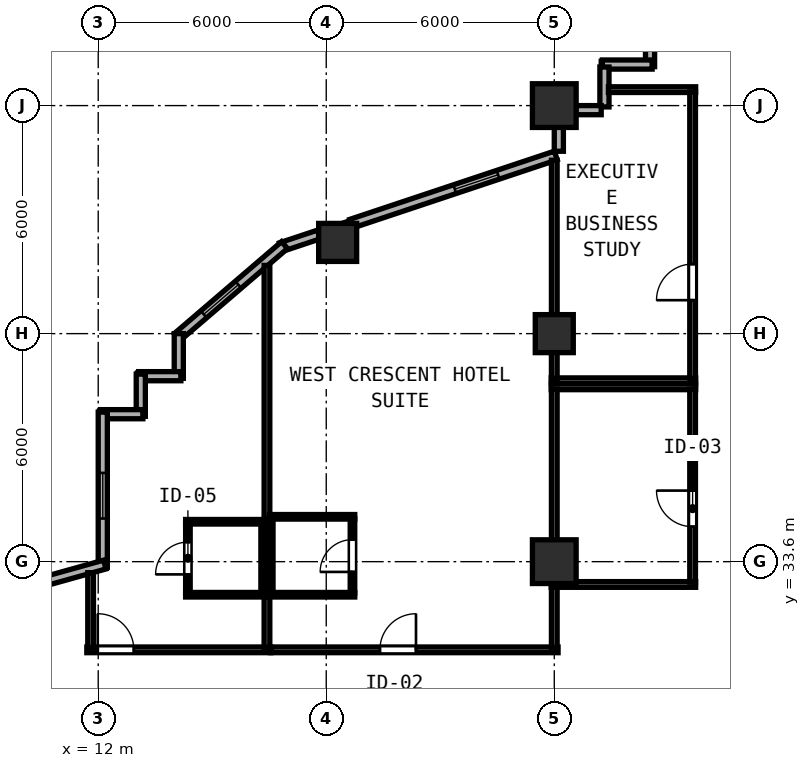
"""IFC4 building model, lengths in metres.
Left out: names, types, materials, properties, quantities, classifications, styles, units other than length and angle.
Written with IfcOpenShell. Run it as: python <this file> out.ifc"""

import sys

from ifc_helpers import new_model, si_unit, direction, frame, frame_2d, origin, origin_2d, place, context, subcontext, project, spatial, rectangle, hollow_rectangle, extrude, element, fill, save


model = new_model("IFC4")
c1 = context("Model", 3, precision=1e-05, world=origin(), true_north=direction((0.0, 1.0)))
c2 = subcontext(c1, "Body", "Model", "MODEL_VIEW")
j1 = project(units=[si_unit("LENGTHUNIT", "METRE"), si_unit("PLANEANGLEUNIT", "RADIAN")], contexts=[c1])
p1 = place(None, origin())
s1 = spatial("IfcSite", under=j1, at=p1, CompositionType="ELEMENT")
p2 = place(p1, origin())
s2 = spatial("IfcBuilding", under=s1, at=p2, CompositionType="ELEMENT")
p3 = place(p2, frame((0.0, 0.0, 62.8)))
s3 = spatial("IfcBuildingStorey", under=s2, at=p3, CompositionType="ELEMENT", Elevation=62.8)
for number, where, z_axis, x_axis in (
    (1, (24.0, 33.6, 0.0), (0.0, 0.0, 1.0), (1.0, 0.0, 0.0)),
    (2, (24.0, 45.6, 0.0), (0.0, 0.0, 1.0), (1.0, 0.0, 0.0)),
):
    element("IfcColumn", number, at=place(p3, frame(where, z_axis=z_axis, x_axis=x_axis)), inside=s3, PredefinedType="COLUMN", context=c2, shape_type="SweptSolid", body=[
        extrude(hollow_rectangle(XDim=1.15, YDim=1.15, WallThickness=0.042, at=origin_2d()), origin(), (0.0, 0.0, 1.0), 3.8),
    ])
for number, where, z_axis, x_axis in (
    (3, (24.0, 39.6, 0.0), (0.0, 0.0, 1.0), (1.0, 0.0, 0.0)),
    (4, (18.3, 42.0, 0.0), (0.0, 0.0, 1.0), (1.0, 0.0, 0.0)),
):
    element("IfcColumn", number, at=place(p3, frame(where, z_axis=z_axis, x_axis=x_axis)), inside=s3, PredefinedType="COLUMN", context=c2, shape_type="SweptSolid", body=[
        extrude(hollow_rectangle(XDim=1.0, YDim=1.0, WallThickness=0.038, at=origin_2d()), origin(), (0.0, 0.0, 1.0), 3.8),
    ])
p4 = place(p3, frame((26.52, 47.995, 0.0), z_axis=(0.0, 0.0, 1.0), x_axis=(0.0, -1.0, 0.0)))
e5 = element("IfcWall", 5, at=p4, inside=s3, PredefinedType="SOLIDWALL", context=c2, shape_type="SweptSolid", body=[
    extrude(rectangle(XDim=1.37, YDim=0.24, at=frame_2d((0.685, 0.0))), origin(), (0.0, 0.0, 1.0), 3.6),
])
p5 = place(p3, frame((26.575, 46.68, 0.0), z_axis=(0.0, 0.0, 1.0), x_axis=(-1.0, 0.0, 0.0)))
e6 = element("IfcWall", 6, at=p5, inside=s3, PredefinedType="SOLIDWALL", context=c2, shape_type="SweptSolid", body=[
    extrude(rectangle(XDim=1.31, YDim=0.24, at=frame_2d((0.655, 0.0))), origin(), (0.0, 0.0, 1.0), 3.6),
])
p6 = place(p3, frame((25.32, 46.615, 0.0), z_axis=(0.0, 0.0, 1.0), x_axis=(0.0, -1.0, 0.0)))
e7 = element("IfcWall", 7, at=p6, inside=s3, PredefinedType="SOLIDWALL", context=c2, shape_type="SweptSolid", body=[
    extrude(rectangle(XDim=1.05, YDim=0.24, at=frame_2d((0.525, 0.0))), origin(), (0.0, 0.0, 1.0), 3.6),
])
p7 = place(p3, frame((25.235, 45.48, 0.0), z_axis=(0.0, 0.0, 1.0), x_axis=(-1.0, 0.0, 0.0)))
e8 = element("IfcWall", 8, at=p7, inside=s3, PredefinedType="SOLIDWALL", context=c2, shape_type="SweptSolid", body=[
    extrude(rectangle(XDim=0.668, YDim=0.24, at=frame_2d((0.334, 0.0))), origin(), (0.0, 0.0, 1.0), 3.6),
])
p8 = place(p3, frame((24.12, 45.033, 0.0), z_axis=(0.0, 0.0, 1.0), x_axis=(0.0, -1.0, 0.0)))
e9 = element("IfcWall", 9, at=p8, inside=s3, PredefinedType="SOLIDWALL", context=c2, shape_type="SweptSolid", body=[
    extrude(rectangle(XDim=0.635, YDim=0.24, at=frame_2d((0.317, 0.0))), origin(), (0.0, 0.0, 1.0), 3.097),
])
p9 = place(p3, frame((24.039, 44.287, 0.0), z_axis=(0.0, 0.0, 1.0), x_axis=(-0.948678995954, -0.316240672014, 0.0)))
e10 = element("IfcWall", 10, at=p9, inside=s3, PredefinedType="SOLIDWALL", context=c2, shape_type="SweptSolid", body=[
    extrude(rectangle(XDim=5.675, YDim=0.24, at=frame_2d((2.837, 0.0))), origin(), (0.0, 0.0, 1.0), 3.097),
])
p10 = place(p9, frame((1.6, 0.0, 0.85)))
e11 = element("IfcOpeningElement", 11, at=p10, cuts=e10, PredefinedType="OPENING", context=c2, shape_type="SweptSolid", body=[
    extrude(rectangle(XDim=1.2, YDim=1.85, at=frame_2d((0.6, 0.925))), frame((0.0, 0.13, 0.0), z_axis=(0.0, -1.0, 0.0), x_axis=(1.0, 0.0, 0.0)), (0.0, 0.0, 1.0), 0.26),
])
p11 = place(p3, frame((17.808, 42.209, 0.0), z_axis=(0.0, 0.0, 1.0), x_axis=(-0.948706457285, -0.316158279832, 0.0)))
e12 = element("IfcWall", 12, at=p11, inside=s3, PredefinedType="SOLIDWALL", context=c2, shape_type="SweptSolid", body=[
    extrude(rectangle(XDim=1.054, YDim=0.24, at=frame_2d((0.527, 0.0))), origin(), (0.0, 0.0, 1.0), 3.6),
])
p12 = place(p3, frame((16.902, 41.929, 0.0), z_axis=(0.0, 0.0, 1.0), x_axis=(-0.759275136126, -0.650769750112, 0.0)))
e13 = element("IfcWall", 13, at=p12, inside=s3, PredefinedType="SOLIDWALL", context=c2, shape_type="SweptSolid", body=[
    extrude(rectangle(XDim=3.719, YDim=0.24, at=frame_2d((1.86, 0.0))), origin(), (0.0, 0.0, 1.0), 3.6),
])
p13 = place(p12, frame((1.6, 0.0, 0.85)))
e14 = element("IfcOpeningElement", 14, at=p13, cuts=e13, PredefinedType="OPENING", context=c2, shape_type="SweptSolid", body=[
    extrude(rectangle(XDim=1.2, YDim=1.85, at=frame_2d((0.6, 0.925))), frame((0.0, 0.13, 0.0), z_axis=(0.0, -1.0, 0.0), x_axis=(1.0, 0.0, 0.0)), (0.0, 0.0, 1.0), 0.26),
])
p14 = place(p3, frame((14.12, 39.6, 0.0), z_axis=(0.0, 0.0, 1.0), x_axis=(0.0, -1.0, 0.0)))
e15 = element("IfcWall", 15, at=p14, inside=s3, PredefinedType="SOLIDWALL", context=c2, shape_type="SweptSolid", body=[
    extrude(rectangle(XDim=1.175, YDim=0.24, at=frame_2d((0.587, 0.0))), origin(), (0.0, 0.0, 1.0), 3.6),
])
p15 = place(p3, frame((14.175, 38.48, 0.0), z_axis=(0.0, 0.0, 1.0), x_axis=(-1.0, 0.0, 0.0)))
e16 = element("IfcWall", 16, at=p15, inside=s3, PredefinedType="SOLIDWALL", context=c2, shape_type="SweptSolid", body=[
    extrude(rectangle(XDim=1.11, YDim=0.24, at=frame_2d((0.555, 0.0))), origin(), (0.0, 0.0, 1.0), 3.6),
])
p16 = place(p3, frame((13.12, 38.535, 0.0), z_axis=(0.0, 0.0, 1.0), x_axis=(0.0, -1.0, 0.0)))
e17 = element("IfcWall", 17, at=p16, inside=s3, PredefinedType="SOLIDWALL", context=c2, shape_type="SweptSolid", body=[
    extrude(rectangle(XDim=1.11, YDim=0.24, at=frame_2d((0.555, 0.0))), origin(), (0.0, 0.0, 1.0), 3.6),
])
p17 = place(p3, frame((13.175, 37.48, 0.0), z_axis=(0.0, 0.0, 1.0), x_axis=(-1.0, 0.0, 0.0)))
e18 = element("IfcWall", 18, at=p17, inside=s3, PredefinedType="SOLIDWALL", context=c2, shape_type="SweptSolid", body=[
    extrude(rectangle(XDim=1.11, YDim=0.24, at=frame_2d((0.555, 0.0))), origin(), (0.0, 0.0, 1.0), 3.6),
])
p18 = place(p3, frame((12.12, 37.535, 0.0), z_axis=(0.0, 0.0, 1.0), x_axis=(0.0, -1.0, 0.0)))
e19 = element("IfcWall", 19, at=p18, inside=s3, PredefinedType="SOLIDWALL", context=c2, shape_type="SweptSolid", body=[
    extrude(rectangle(XDim=4.081, YDim=0.24, at=frame_2d((2.041, 0.0))), origin(), (0.0, 0.0, 1.0), 3.6),
])
p19 = place(p18, frame((1.6, 0.0, 0.85)))
e20 = element("IfcOpeningElement", 20, at=p19, cuts=e19, PredefinedType="OPENING", context=c2, shape_type="SweptSolid", body=[
    extrude(rectangle(XDim=1.2, YDim=1.85, at=frame_2d((0.6, 0.925))), frame((0.0, 0.13, 0.0), z_axis=(0.0, -1.0, 0.0), x_axis=(1.0, 0.0, 0.0)), (0.0, 0.0, 1.0), 0.26),
])
p20 = place(p3, frame((12.173, 33.524, 0.0), z_axis=(0.0, 0.0, 1.0), x_axis=(-0.963197271032, -0.268795493036, 0.0)))
e21 = element("IfcWall", 21, at=p20, inside=s3, PredefinedType="SOLIDWALL", context=c2, shape_type="SweptSolid", body=[
    extrude(rectangle(XDim=9.095, YDim=0.24, at=frame_2d((4.548, 0.0))), origin(), (0.0, 0.0, 1.0), 3.6),
])
p21 = place(p20, frame((1.6, 0.0, 0.85)))
e22 = element("IfcOpeningElement", 22, at=p21, cuts=e21, PredefinedType="OPENING", context=c2, shape_type="SweptSolid", body=[
    extrude(rectangle(XDim=1.2, YDim=1.85, at=frame_2d((0.6, 0.925))), frame((0.0, 0.13, 0.0), z_axis=(0.0, -1.0, 0.0), x_axis=(1.0, 0.0, 0.0)), (0.0, 0.0, 1.0), 0.26),
])
p22 = place(p20, frame((7.0, 0.0, 0.85)))
e23 = element("IfcOpeningElement", 23, at=p22, cuts=e21, PredefinedType="OPENING", context=c2, shape_type="SweptSolid", body=[
    extrude(rectangle(XDim=1.2, YDim=1.85, at=frame_2d((0.6, 0.925))), frame((0.0, 0.13, 0.0), z_axis=(0.0, -1.0, 0.0), x_axis=(1.0, 0.0, 0.0)), (0.0, 0.0, 1.0), 0.26),
])
for number, where, z_axis, x_axis in (
    (24, (23.92, 38.2, 0.0), (0.0, 0.0, 1.0), (1.0, 0.0, 0.0)),
    (25, (23.92, 33.0, 0.0), (0.0, 0.0, 1.0), (1.0, 0.0, 0.0)),
):
    element("IfcWall", number, at=place(p3, frame(where, z_axis=z_axis, x_axis=x_axis)), inside=s3, PredefinedType="PARTITIONING", context=c2, shape_type="SweptSolid", body=[
        extrude(rectangle(XDim=3.8, YDim=0.15, at=frame_2d((1.9, 0.0))), origin(), (0.0, 0.0, 1.0), 3.6),
    ])
p23 = place(p3, frame((24.0, 33.06, 0.0), z_axis=(0.0, 0.0, 1.0), x_axis=(0.0, 1.0, 0.0)))
e26 = element("IfcWall", 26, at=p23, inside=s3, PredefinedType="PARTITIONING", context=c2, shape_type="SweptSolid", body=[
    extrude(rectangle(XDim=5.08, YDim=0.15, at=frame_2d((2.54, 0.0))), origin(), (0.0, 0.0, 1.0), 3.097),
])
p24 = place(p3, frame((27.64, 33.06, 0.0), z_axis=(0.0, 0.0, 1.0), x_axis=(0.0, 1.0, 0.0)))
e27 = element("IfcWall", 27, at=p24, inside=s3, PredefinedType="PARTITIONING", context=c2, shape_type="SweptSolid", body=[
    extrude(rectangle(XDim=5.08, YDim=0.15, at=frame_2d((2.54, 0.0))), origin(), (0.0, 0.0, 1.0), 3.6),
])
p25 = place(p24, frame((2.41, 0.0, 0.0), z_axis=(0.0, 0.0, 1.0), x_axis=(-1.0, 0.0, 0.0)))
e28 = element("IfcOpeningElement", 28, at=p25, cuts=e27, PredefinedType="OPENING", context=c2, shape_type="SweptSolid", body=[
    extrude(rectangle(XDim=0.95, YDim=2.12, at=frame_2d((0.475, 1.06))), frame((0.0, 0.085, 0.0), z_axis=(0.0, -1.0, 0.0), x_axis=(1.0, 0.0, 0.0)), (0.0, 0.0, 1.0), 0.17),
])
p26 = place(p3, frame((25.425, 46.02, 0.0), z_axis=(0.0, 0.0, 1.0), x_axis=(1.0, 0.0, 0.0)))
e29 = element("IfcWall", 29, at=p26, inside=s3, PredefinedType="PARTITIONING", context=c2, shape_type="SweptSolid", body=[
    extrude(rectangle(XDim=2.295, YDim=0.15, at=frame_2d((1.147, 0.0))), origin(), (0.0, 0.0, 1.0), 3.6),
])
p27 = place(p3, frame((23.92, 38.36, 0.0), z_axis=(0.0, 0.0, 1.0), x_axis=(1.0, 0.0, 0.0)))
e30 = element("IfcWall", 30, at=p27, inside=s3, PredefinedType="PARTITIONING", context=c2, shape_type="SweptSolid", body=[
    extrude(rectangle(XDim=3.8, YDim=0.15, at=frame_2d((1.9, 0.0))), origin(), (0.0, 0.0, 1.0), 3.6),
])
p28 = place(p3, frame((24.0, 38.42, 0.0), z_axis=(0.0, 0.0, 1.0), x_axis=(0.0, 1.0, 0.0)))
e31 = element("IfcWall", 31, at=p28, inside=s3, PredefinedType="PARTITIONING", context=c2, shape_type="SweptSolid", body=[
    extrude(rectangle(XDim=5.743, YDim=0.15, at=frame_2d((2.872, 0.0))), origin(), (0.0, 0.0, 1.0), 3.097),
])
p29 = place(p3, frame((27.64, 38.42, 0.0), z_axis=(0.0, 0.0, 1.0), x_axis=(0.0, 1.0, 0.0)))
e32 = element("IfcWall", 32, at=p29, inside=s3, PredefinedType="PARTITIONING", context=c2, shape_type="SweptSolid", body=[
    extrude(rectangle(XDim=7.54, YDim=0.15, at=frame_2d((3.77, 0.0))), origin(), (0.0, 0.0, 1.0), 3.6),
])
p30 = place(p29, frame((3.01, 0.0, 0.0), z_axis=(0.0, 0.0, 1.0), x_axis=(-1.0, 0.0, 0.0)))
e33 = element("IfcOpeningElement", 33, at=p30, cuts=e32, PredefinedType="OPENING", context=c2, shape_type="SweptSolid", body=[
    extrude(rectangle(XDim=0.95, YDim=2.12, at=frame_2d((0.475, 1.06))), frame((0.0, 0.085, 0.0), z_axis=(0.0, -1.0, 0.0), x_axis=(1.0, 0.0, 0.0)), (0.0, 0.0, 1.0), 0.17),
])
p31 = place(p3, frame((11.7, 31.28, 0.0), z_axis=(0.0, 0.0, 1.0), x_axis=(1.0, 0.0, 0.0)))
e34 = element("IfcWall", 34, at=p31, inside=s3, PredefinedType="PARTITIONING", context=c2, shape_type="SweptSolid", body=[
    extrude(rectangle(XDim=4.84, YDim=0.15, at=frame_2d((2.42, 0.0))), origin(), (0.0, 0.0, 1.0), 3.6),
])
p32 = place(p31, frame((0.288, 0.0, 0.0)))
e35 = element("IfcOpeningElement", 35, at=p32, cuts=e34, PredefinedType="OPENING", context=c2, shape_type="SweptSolid", body=[
    extrude(rectangle(XDim=0.95, YDim=2.15, at=frame_2d((0.475, 1.075))), frame((0.0, 0.085, 0.0), z_axis=(0.0, -1.0, 0.0), x_axis=(1.0, 0.0, 0.0)), (0.0, 0.0, 1.0), 0.17),
])
p33 = place(p3, frame((11.8, 31.34, 0.0), z_axis=(0.0, 0.0, 1.0), x_axis=(0.0, 1.0, 0.0)))
e36 = element("IfcWall", 36, at=p33, inside=s3, PredefinedType="PARTITIONING", context=c2, shape_type="SweptSolid", body=[
    extrude(rectangle(XDim=1.97, YDim=0.15, at=frame_2d((0.985, 0.0))), origin(), (0.0, 0.0, 1.0), 3.6),
])
p34 = place(p3, frame((16.44, 31.34, 0.0), z_axis=(0.0, 0.0, 1.0), x_axis=(0.0, 1.0, 0.0)))
e37 = element("IfcWall", 37, at=p34, inside=s3, PredefinedType="PARTITIONING", context=c2, shape_type="SweptSolid", body=[
    extrude(rectangle(XDim=10.055, YDim=0.15, at=frame_2d((5.027, 0.0))), origin(), (0.0, 0.0, 1.0), 3.6),
])
for number, where, z_axis, x_axis in (
    (38, (14.3, 34.65, 0.0), (0.0, 0.0, 1.0), (1.0, 0.0, 0.0)),
    (39, (14.3, 32.73, 0.0), (0.0, 0.0, 1.0), (1.0, 0.0, 0.0)),
):
    element("IfcWall", number, at=place(p3, frame(where, z_axis=z_axis, x_axis=x_axis)), inside=s3, PredefinedType="PARTITIONING", context=c2, shape_type="SweptSolid", body=[
        extrude(rectangle(XDim=2.08, YDim=0.12, at=frame_2d((1.04, 0.0))), origin(), (0.0, 0.0, 1.0), 3.6),
    ])
p35 = place(p3, frame((14.36, 32.775, 0.0), z_axis=(0.0, 0.0, 1.0), x_axis=(0.0, 1.0, 0.0)))
e40 = element("IfcWall", 40, at=p35, inside=s3, PredefinedType="PARTITIONING", context=c2, shape_type="SweptSolid", body=[
    extrude(rectangle(XDim=1.83, YDim=0.12, at=frame_2d((0.915, 0.0))), origin(), (0.0, 0.0, 1.0), 3.6),
])
p36 = place(p35, frame((1.34, 0.0, 0.0), z_axis=(0.0, 0.0, 1.0), x_axis=(-1.0, 0.0, 0.0)))
e41 = element("IfcOpeningElement", 41, at=p36, cuts=e40, PredefinedType="OPENING", context=c2, shape_type="SweptSolid", body=[
    extrude(rectangle(XDim=0.85, YDim=2.1, at=frame_2d((0.425, 1.05))), frame((0.0, 0.07, 0.0), z_axis=(0.0, -1.0, 0.0), x_axis=(1.0, 0.0, 0.0)), (0.0, 0.0, 1.0), 0.14),
])
p37 = place(p3, frame((16.34, 32.775, 0.0), z_axis=(0.0, 0.0, 1.0), x_axis=(0.0, 1.0, 0.0)))
e42 = element("IfcWall", 42, at=p37, inside=s3, PredefinedType="PARTITIONING", context=c2, shape_type="SweptSolid", body=[
    extrude(rectangle(XDim=1.83, YDim=0.12, at=frame_2d((0.915, 0.0))), origin(), (0.0, 0.0, 1.0), 3.6),
])
p38 = place(p3, frame((16.542, 31.28, 0.0), z_axis=(0.0, 0.0, 1.0), x_axis=(1.0, 0.0, 0.0)))
e43 = element("IfcWall", 43, at=p38, inside=s3, PredefinedType="PARTITIONING", context=c2, shape_type="SweptSolid", body=[
    extrude(rectangle(XDim=7.558, YDim=0.15, at=frame_2d((3.779, 0.0))), origin(), (0.0, 0.0, 1.0), 3.6),
])
p39 = place(p38, frame((2.869, 0.0, 0.0)))
e44 = element("IfcOpeningElement", 44, at=p39, cuts=e43, PredefinedType="OPENING", context=c2, shape_type="SweptSolid", body=[
    extrude(rectangle(XDim=0.95, YDim=2.18, at=frame_2d((0.475, 1.09))), frame((0.0, 0.085, 0.0), z_axis=(0.0, -1.0, 0.0), x_axis=(1.0, 0.0, 0.0)), (0.0, 0.0, 1.0), 0.17),
])
p40 = place(p3, frame((24.0, 31.34, 0.0), z_axis=(0.0, 0.0, 1.0), x_axis=(0.0, 1.0, 0.0)))
e45 = element("IfcWall", 45, at=p40, inside=s3, PredefinedType="PARTITIONING", context=c2, shape_type="SweptSolid", body=[
    extrude(rectangle(XDim=1.6, YDim=0.15, at=frame_2d((0.8, 0.0))), origin(), (0.0, 0.0, 1.0), 3.097),
])
for number, where, z_axis, x_axis in (
    (46, (16.5, 34.78, 0.0), (0.0, 0.0, 1.0), (1.0, 0.0, 0.0)),
    (47, (16.5, 32.73, 0.0), (0.0, 0.0, 1.0), (1.0, 0.0, 0.0)),
):
    element("IfcWall", number, at=place(p3, frame(where, z_axis=z_axis, x_axis=x_axis)), inside=s3, PredefinedType="PARTITIONING", context=c2, shape_type="SweptSolid", body=[
        extrude(rectangle(XDim=2.25, YDim=0.12, at=frame_2d((1.125, 0.0))), origin(), (0.0, 0.0, 1.0), 3.6),
    ])
p41 = place(p3, frame((16.54, 32.775, 0.0), z_axis=(0.0, 0.0, 1.0), x_axis=(0.0, 1.0, 0.0)))
e48 = element("IfcWall", 48, at=p41, inside=s3, PredefinedType="PARTITIONING", context=c2, shape_type="SweptSolid", body=[
    extrude(rectangle(XDim=1.96, YDim=0.12, at=frame_2d((0.98, 0.0))), origin(), (0.0, 0.0, 1.0), 3.6),
])
p42 = place(p3, frame((18.69, 32.775, 0.0), z_axis=(0.0, 0.0, 1.0), x_axis=(0.0, 1.0, 0.0)))
e49 = element("IfcWall", 49, at=p42, inside=s3, PredefinedType="PARTITIONING", context=c2, shape_type="SweptSolid", body=[
    extrude(rectangle(XDim=1.96, YDim=0.12, at=frame_2d((0.98, 0.0))), origin(), (0.0, 0.0, 1.0), 3.6),
])
p43 = place(p42, frame((0.555, 0.0, 0.0)))
e50 = element("IfcOpeningElement", 50, at=p43, cuts=e49, PredefinedType="OPENING", context=c2, shape_type="SweptSolid", body=[
    extrude(rectangle(XDim=0.85, YDim=2.1, at=frame_2d((0.425, 1.05))), frame((0.0, 0.07, 0.0), z_axis=(0.0, -1.0, 0.0), x_axis=(1.0, 0.0, 0.0)), (0.0, 0.0, 1.0), 0.14),
])
p44 = place(p10, origin())
e51 = element("IfcWindow", 51, at=p44, inside=s3, PartitioningType="SINGLE_PANEL", PredefinedType="WINDOW", context=c2, shape_type="SweptSolid", body=[
    extrude(rectangle(XDim=1.2, YDim=1.85, at=frame_2d((0.6, 0.925))), frame((0.0, 0.03, 0.0), z_axis=(0.0, -1.0, 0.0), x_axis=(1.0, 0.0, 0.0)), (0.0, 0.0, 1.0), 0.06),
])
fill(e11, e51)
p45 = place(p13, origin())
e52 = element("IfcWindow", 52, at=p45, inside=s3, PartitioningType="SINGLE_PANEL", PredefinedType="WINDOW", context=c2, shape_type="SweptSolid", body=[
    extrude(rectangle(XDim=1.2, YDim=1.85, at=frame_2d((0.6, 0.925))), frame((0.0, 0.03, 0.0), z_axis=(0.0, -1.0, 0.0), x_axis=(1.0, 0.0, 0.0)), (0.0, 0.0, 1.0), 0.06),
])
fill(e14, e52)
p46 = place(p19, origin())
e53 = element("IfcWindow", 53, at=p46, inside=s3, PartitioningType="SINGLE_PANEL", PredefinedType="WINDOW", context=c2, shape_type="SweptSolid", body=[
    extrude(rectangle(XDim=1.2, YDim=1.85, at=frame_2d((0.6, 0.925))), frame((0.0, 0.03, 0.0), z_axis=(0.0, -1.0, 0.0), x_axis=(1.0, 0.0, 0.0)), (0.0, 0.0, 1.0), 0.06),
])
fill(e20, e53)
p47 = place(p25, origin())
e54 = element("IfcDoor", 54, at=p47, inside=s3, OperationType="SINGLE_SWING_LEFT", PredefinedType="DOOR", context=c2, shape_type="SweptSolid", body=[
    extrude(rectangle(XDim=0.95, YDim=2.12, at=frame_2d((0.475, 1.06))), frame((0.0, 0.025, 0.0), z_axis=(0.0, -1.0, 0.0), x_axis=(1.0, 0.0, 0.0)), (0.0, 0.0, 1.0), 0.05),
])
fill(e28, e54)
p48 = place(p30, origin())
e55 = element("IfcDoor", 55, at=p48, inside=s3, OperationType="SINGLE_SWING_RIGHT", PredefinedType="DOOR", context=c2, shape_type="SweptSolid", body=[
    extrude(rectangle(XDim=0.95, YDim=2.12, at=frame_2d((0.475, 1.06))), frame((0.0, 0.025, 0.0), z_axis=(0.0, -1.0, 0.0), x_axis=(1.0, 0.0, 0.0)), (0.0, 0.0, 1.0), 0.05),
])
fill(e33, e55)
p49 = place(p32, origin())
e56 = element("IfcDoor", 56, at=p49, inside=s3, OperationType="SINGLE_SWING_LEFT", PredefinedType="DOOR", context=c2, shape_type="SweptSolid", body=[
    extrude(rectangle(XDim=0.95, YDim=2.15, at=frame_2d((0.475, 1.075))), frame((0.0, 0.025, 0.0), z_axis=(0.0, -1.0, 0.0), x_axis=(1.0, 0.0, 0.0)), (0.0, 0.0, 1.0), 0.05),
])
fill(e35, e56)
p50 = place(p36, origin())
e57 = element("IfcDoor", 57, at=p50, inside=s3, OperationType="SINGLE_SWING_RIGHT", PredefinedType="DOOR", context=c2, shape_type="SweptSolid", body=[
    extrude(rectangle(XDim=0.85, YDim=2.1, at=frame_2d((0.425, 1.05))), frame((0.0, 0.025, 0.0), z_axis=(0.0, -1.0, 0.0), x_axis=(1.0, 0.0, 0.0)), (0.0, 0.0, 1.0), 0.05),
])
fill(e41, e57)
p51 = place(p39, origin())
e58 = element("IfcDoor", 58, at=p51, inside=s3, OperationType="SINGLE_SWING_RIGHT", PredefinedType="DOOR", context=c2, shape_type="SweptSolid", body=[
    extrude(rectangle(XDim=0.95, YDim=2.18, at=frame_2d((0.475, 1.09))), frame((0.0, 0.025, 0.0), z_axis=(0.0, -1.0, 0.0), x_axis=(1.0, 0.0, 0.0)), (0.0, 0.0, 1.0), 0.05),
])
fill(e44, e58)
p52 = place(p43, origin())
e59 = element("IfcDoor", 59, at=p52, inside=s3, OperationType="SINGLE_SWING_LEFT", PredefinedType="DOOR", context=c2, shape_type="SweptSolid", body=[
    extrude(rectangle(XDim=0.85, YDim=2.1, at=frame_2d((0.425, 1.05))), frame((0.0, 0.025, 0.0), z_axis=(0.0, -1.0, 0.0), x_axis=(1.0, 0.0, 0.0)), (0.0, 0.0, 1.0), 0.05),
])
fill(e50, e59)
save(model, sys.argv[1])
